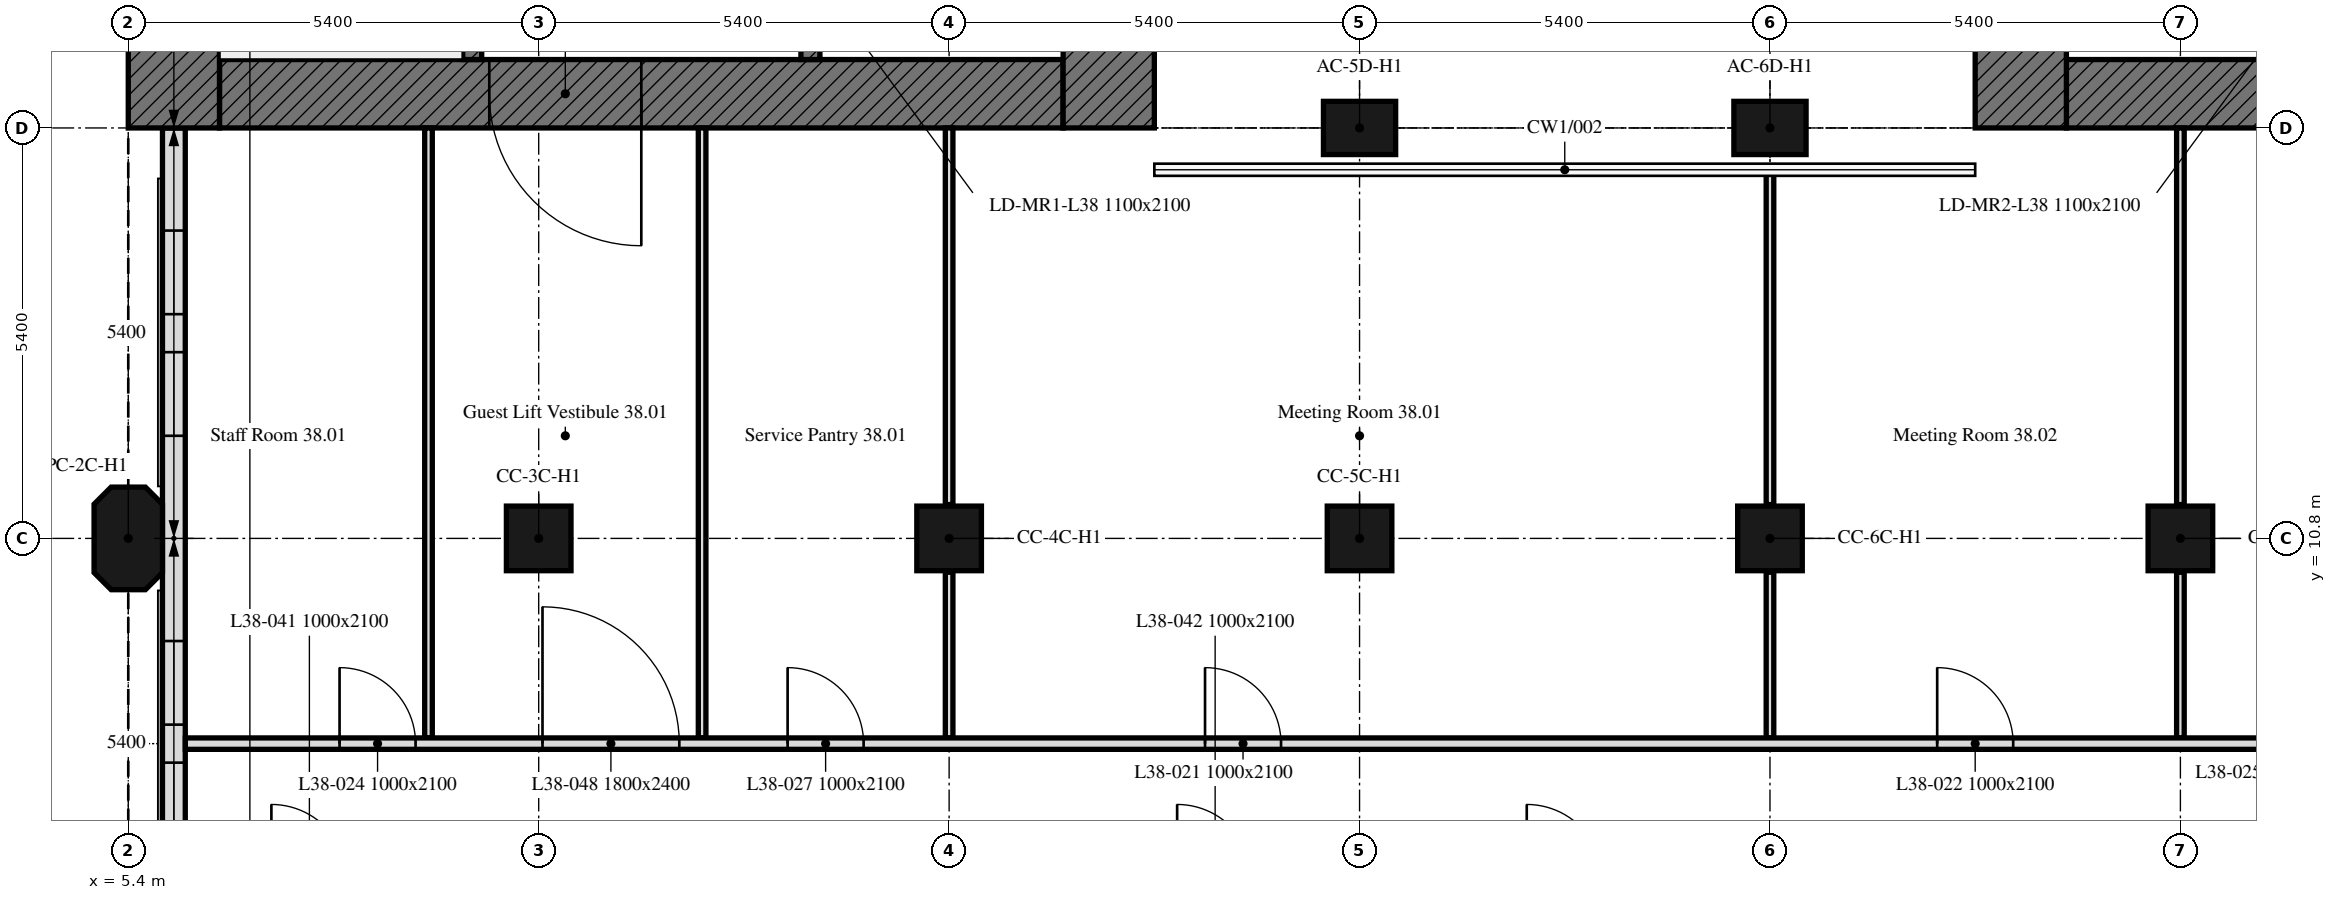
"""IFC4 building model, lengths in metres.
Left out: names, types, materials, properties, quantities, classifications, styles, units other than length and angle.
Written with IfcOpenShell. Run it as: python <this file> out.ifc"""

import sys

from ifc_helpers import new_model, si_unit, direction, frame, frame_2d, origin, origin_2d, place, context, subcontext, project, spatial, polyline, rectangle, outline, extrude, element, fill, save


model = new_model("IFC4")
c1 = context("Model", 3, precision=1e-05, world=origin(), true_north=direction((0.0, 1.0)))
c2 = subcontext(c1, "Body", "Model", "MODEL_VIEW")
j1 = project(units=[si_unit("LENGTHUNIT", "METRE"), si_unit("PLANEANGLEUNIT", "RADIAN")], contexts=[c1])
p1 = place(None, origin())
s1 = spatial("IfcSite", under=j1, at=p1, CompositionType="ELEMENT")
p2 = place(p1, origin())
s2 = spatial("IfcBuilding", under=s1, at=p2, CompositionType="ELEMENT")
p3 = place(p2, frame((0.0, 0.0, 162.7)))
s3 = spatial("IfcBuildingStorey", under=s2, at=p3, CompositionType="ELEMENT", Elevation=162.7)
p4 = place(p3, frame((5.4, 10.8, 0.0), z_axis=(0.0, 0.0, 1.0), x_axis=(0.0, 1.0, 0.0)))
e1 = element("IfcColumn", 1, at=p4, inside=s3, PredefinedType="COLUMN", context=c2, shape_type="SweptSolid", body=[
    extrude(outline(polyline([(-0.45, -0.45), (0.45, -0.45), (0.675, -0.225), (0.675, 0.225), (0.45, 0.45), (-0.45, 0.45), (-0.675, 0.225), (-0.675, -0.225), (-0.45, -0.45)])), origin(), (0.0, 0.0, 1.0), 3.0),
])
for number, where, z_axis, x_axis in (
    (2, (10.8, 10.8, 0.0), (0.0, 0.0, 1.0), (1.0, 0.0, 0.0)),
    (3, (16.2, 10.8, 0.0), (0.0, 0.0, 1.0), (1.0, 0.0, 0.0)),
    (4, (21.6, 10.8, 0.0), (0.0, 0.0, 1.0), (1.0, 0.0, 0.0)),
    (5, (27.0, 10.8, 0.0), (0.0, 0.0, 1.0), (1.0, 0.0, 0.0)),
    (6, (32.4, 10.8, 0.0), (0.0, 0.0, 1.0), (1.0, 0.0, 0.0)),
):
    element("IfcColumn", number, at=place(p3, frame(where, z_axis=z_axis, x_axis=x_axis)), inside=s3, PredefinedType="COLUMN", context=c2, shape_type="SweptSolid", body=[
        extrude(rectangle(XDim=0.85, YDim=0.85, at=origin_2d()), origin(), (0.0, 0.0, 1.0), 3.0),
    ])
for number, where, z_axis, x_axis in (
    (7, (21.6, 16.2, 0.0), (0.0, 0.0, 1.0), (1.0, 0.0, 0.0)),
    (8, (27.0, 16.2, 0.0), (0.0, 0.0, 1.0), (1.0, 0.0, 0.0)),
):
    element("IfcColumn", number, at=place(p3, frame(where, z_axis=z_axis, x_axis=x_axis)), inside=s3, PredefinedType="COLUMN", context=c2, shape_type="SweptSolid", body=[
        extrude(rectangle(XDim=0.95, YDim=0.7, at=origin_2d()), origin(), (0.0, 0.0, 1.0), 3.0),
    ])
p5 = place(p3, frame((6.0, 16.2, 0.0), z_axis=(0.0, 0.0, 1.0), x_axis=(0.0, -1.0, 0.0)))
e9 = element("IfcWall", 9, at=p5, inside=s3, PredefinedType="SOLIDWALL", context=c2, shape_type="SweptSolid", body=[
    extrude(rectangle(XDim=10.614, YDim=0.3, at=frame_2d((5.307, 0.0))), origin(), (0.0, 0.0, 1.0), 3.0),
])
p6 = place(p5, frame((1.35, 0.0, 0.9)))
e10 = element("IfcOpeningElement", 10, at=p6, cuts=e9, PredefinedType="OPENING", context=c2, shape_type="SweptSolid", body=[
    extrude(rectangle(XDim=1.1, YDim=1.7, at=frame_2d((0.55, 0.85))), frame((0.0, 0.16, 0.0), z_axis=(0.0, -1.0, 0.0), x_axis=(1.0, 0.0, 0.0)), (0.0, 0.0, 1.0), 0.32),
])
p7 = place(p5, frame((2.95, 0.0, 0.9)))
e11 = element("IfcOpeningElement", 11, at=p7, cuts=e9, PredefinedType="OPENING", context=c2, shape_type="SweptSolid", body=[
    extrude(rectangle(XDim=1.1, YDim=1.7, at=frame_2d((0.55, 0.85))), frame((0.0, 0.16, 0.0), z_axis=(0.0, -1.0, 0.0), x_axis=(1.0, 0.0, 0.0)), (0.0, 0.0, 1.0), 0.32),
])
p8 = place(p5, frame((6.75, 0.0, 0.9)))
e12 = element("IfcOpeningElement", 12, at=p8, cuts=e9, PredefinedType="OPENING", context=c2, shape_type="SweptSolid", body=[
    extrude(rectangle(XDim=1.1, YDim=1.7, at=frame_2d((0.55, 0.85))), frame((0.0, 0.16, 0.0), z_axis=(0.0, -1.0, 0.0), x_axis=(1.0, 0.0, 0.0)), (0.0, 0.0, 1.0), 0.32),
])
p9 = place(p5, frame((8.35, 0.0, 0.9)))
e13 = element("IfcOpeningElement", 13, at=p9, cuts=e9, PredefinedType="OPENING", context=c2, shape_type="SweptSolid", body=[
    extrude(rectangle(XDim=1.1, YDim=1.7, at=frame_2d((0.55, 0.85))), frame((0.0, 0.16, 0.0), z_axis=(0.0, -1.0, 0.0), x_axis=(1.0, 0.0, 0.0)), (0.0, 0.0, 1.0), 0.32),
])
p10 = place(p3, frame((17.7, 16.65, 0.0), z_axis=(0.0, 0.0, 1.0), x_axis=(-1.0, 0.0, 0.0)))
e14 = element("IfcWall", 14, at=p10, inside=s3, PredefinedType="SOLIDWALL", context=c2, shape_type="SweptSolid", body=[
    extrude(rectangle(XDim=11.1, YDim=0.9, at=frame_2d((5.55, 0.0))), origin(), (0.0, 0.0, 1.0), 3.0),
])
p11 = place(p10, frame((5.55, 0.0, 0.0)))
e15 = element("IfcOpeningElement", 15, at=p11, cuts=e14, PredefinedType="OPENING", context=c2, shape_type="SweptSolid", body=[
    extrude(rectangle(XDim=2.0, YDim=2.4, at=frame_2d((1.0, 1.2))), frame((0.0, 0.45, 0.0), z_axis=(0.0, -1.0, 0.0), x_axis=(1.0, 0.0, 0.0)), (0.0, 0.0, 1.0), 0.9),
])
for number, where, z_axis, x_axis in (
    (16, (6.0, 16.2, 0.0), (0.0, 0.0, 1.0), (0.0, 1.0, 0.0)),
    (17, (18.3, 32.4, 0.0), (0.0, 0.0, 1.0), (0.0, -1.0, 0.0)),
):
    element("IfcWall", number, at=place(p3, frame(where, z_axis=z_axis, x_axis=x_axis)), inside=s3, PredefinedType="SOLIDWALL", context=c2, shape_type="SweptSolid", body=[
        extrude(rectangle(XDim=16.2, YDim=1.2, at=frame_2d((8.1, 0.0))), origin(), (0.0, 0.0, 1.0), 3.0),
    ])
p12 = place(p3, frame((9.925, 17.1, 0.0), z_axis=(0.0, 0.0, 1.0), x_axis=(0.0, 1.0, 0.0)))
e18 = element("IfcWall", 18, at=p12, inside=s3, PredefinedType="SOLIDWALL", context=c2, shape_type="SweptSolid", body=[
    extrude(rectangle(XDim=14.4, YDim=0.25, at=frame_2d((7.2, 0.0))), origin(), (0.0, 0.0, 1.0), 3.0),
])
p13 = place(p12, frame((4.6, 0.0, 0.0)))
e19 = element("IfcOpeningElement", 19, at=p13, cuts=e18, PredefinedType="OPENING", context=c2, shape_type="SweptSolid", body=[
    extrude(rectangle(XDim=1.0, YDim=2.1, at=frame_2d((0.5, 1.05))), frame((0.0, 0.125, 0.0), z_axis=(0.0, -1.0, 0.0), x_axis=(1.0, 0.0, 0.0)), (0.0, 0.0, 1.0), 0.25),
])
p14 = place(p12, frame((7.062, 0.0, 0.0)))
e20 = element("IfcOpeningElement", 20, at=p14, cuts=e18, PredefinedType="OPENING", context=c2, shape_type="SweptSolid", body=[
    extrude(rectangle(XDim=1.2, YDim=2.1, at=frame_2d((0.6, 1.05))), frame((0.0, 0.125, 0.0), z_axis=(0.0, -1.0, 0.0), x_axis=(1.0, 0.0, 0.0)), (0.0, 0.0, 1.0), 0.25),
])
p15 = place(p12, frame((10.106, 0.0, 0.0)))
e21 = element("IfcOpeningElement", 21, at=p15, cuts=e18, PredefinedType="OPENING", context=c2, shape_type="SweptSolid", body=[
    extrude(rectangle(XDim=0.9, YDim=2.1, at=frame_2d((0.45, 1.05))), frame((0.0, 0.125, 0.0), z_axis=(0.0, -1.0, 0.0), x_axis=(1.0, 0.0, 0.0)), (0.0, 0.0, 1.0), 0.25),
])
p16 = place(p12, frame((12.048, 0.0, 0.0)))
e22 = element("IfcOpeningElement", 22, at=p16, cuts=e18, PredefinedType="OPENING", context=c2, shape_type="SweptSolid", body=[
    extrude(rectangle(XDim=0.9, YDim=2.1, at=frame_2d((0.45, 1.05))), frame((0.0, 0.125, 0.0), z_axis=(0.0, -1.0, 0.0), x_axis=(1.0, 0.0, 0.0)), (0.0, 0.0, 1.0), 0.25),
])
p17 = place(p12, frame((13.354, 0.0, 0.0)))
e23 = element("IfcOpeningElement", 23, at=p17, cuts=e18, PredefinedType="OPENING", context=c2, shape_type="SweptSolid", body=[
    extrude(rectangle(XDim=0.9, YDim=2.1, at=frame_2d((0.45, 1.05))), frame((0.0, 0.125, 0.0), z_axis=(0.0, -1.0, 0.0), x_axis=(1.0, 0.0, 0.0)), (0.0, 0.0, 1.0), 0.25),
])
p18 = place(p3, frame((14.375, 17.1, 0.0), z_axis=(0.0, 0.0, 1.0), x_axis=(0.0, 1.0, 0.0)))
e24 = element("IfcWall", 24, at=p18, inside=s3, PredefinedType="SOLIDWALL", context=c2, shape_type="SweptSolid", body=[
    extrude(rectangle(XDim=14.4, YDim=0.25, at=frame_2d((7.2, 0.0))), origin(), (0.0, 0.0, 1.0), 3.0),
])
p19 = place(p18, frame((13.15, 0.0, 0.0)))
e25 = element("IfcOpeningElement", 25, at=p19, cuts=e24, PredefinedType="OPENING", context=c2, shape_type="SweptSolid", body=[
    extrude(rectangle(XDim=1.0, YDim=2.1, at=frame_2d((0.5, 1.05))), frame((0.0, 0.125, 0.0), z_axis=(0.0, -1.0, 0.0), x_axis=(1.0, 0.0, 0.0)), (0.0, 0.0, 1.0), 0.25),
])
p20 = place(p18, frame((0.6, 0.0, 0.0)))
e26 = element("IfcOpeningElement", 26, at=p20, cuts=e24, PredefinedType="OPENING", context=c2, shape_type="SweptSolid", body=[
    extrude(rectangle(XDim=1.1, YDim=2.1, at=frame_2d((0.55, 1.05))), frame((0.0, 0.125, 0.0), z_axis=(0.0, -1.0, 0.0), x_axis=(1.0, 0.0, 0.0)), (0.0, 0.0, 1.0), 0.25),
])
p21 = place(p18, frame((3.25, 0.0, 0.0)))
e27 = element("IfcOpeningElement", 27, at=p21, cuts=e24, PredefinedType="OPENING", context=c2, shape_type="SweptSolid", body=[
    extrude(rectangle(XDim=0.9, YDim=2.1, at=frame_2d((0.45, 1.05))), frame((0.0, 0.125, 0.0), z_axis=(0.0, -1.0, 0.0), x_axis=(1.0, 0.0, 0.0)), (0.0, 0.0, 1.0), 0.25),
])
p22 = place(p3, frame((42.0, 16.65, 0.0), z_axis=(0.0, 0.0, 1.0), x_axis=(-1.0, 0.0, 0.0)))
e28 = element("IfcWall", 28, at=p22, inside=s3, PredefinedType="SOLIDWALL", context=c2, shape_type="SweptSolid", body=[
    extrude(rectangle(XDim=11.1, YDim=0.9, at=frame_2d((5.55, 0.0))), origin(), (0.0, 0.0, 1.0), 3.0),
])
p23 = place(p22, frame((3.55, 0.0, 0.0)))
e29 = element("IfcOpeningElement", 29, at=p23, cuts=e28, PredefinedType="OPENING", context=c2, shape_type="SweptSolid", body=[
    extrude(rectangle(XDim=2.0, YDim=2.4, at=frame_2d((1.0, 1.2))), frame((0.0, 0.45, 0.0), z_axis=(0.0, -1.0, 0.0), x_axis=(1.0, 0.0, 0.0)), (0.0, 0.0, 1.0), 0.9),
])
p24 = place(p3, frame((30.3, 16.2, 0.0), z_axis=(0.0, 0.0, 1.0), x_axis=(0.0, 1.0, 0.0)))
e30 = element("IfcWall", 30, at=p24, inside=s3, PredefinedType="SOLIDWALL", context=c2, shape_type="SweptSolid", body=[
    extrude(rectangle(XDim=16.2, YDim=1.2, at=frame_2d((8.1, 0.0))), origin(), (0.0, 0.0, 1.0), 3.0),
])
p25 = place(p3, frame((16.2, 16.2, 0.0), z_axis=(0.0, 0.0, 1.0), x_axis=(0.0, -1.0, 0.0)))
e31 = element("IfcWall", 31, at=p25, inside=s3, PredefinedType="PARTITIONING", context=c2, shape_type="SweptSolid", body=[
    extrude(rectangle(XDim=4.955, YDim=0.1, at=frame_2d((2.478, 0.0))), origin(), (0.0, 0.0, 1.0), 2.4),
])
for number, where, z_axis, x_axis in (
    (32, (16.2, 10.355, 0.0), (0.0, 0.0, 1.0), (0.0, -1.0, 0.0)),
    (33, (27.0, 8.175, 0.0), (0.0, 0.0, 1.0), (0.0, 1.0, 0.0)),
):
    element("IfcWall", number, at=place(p3, frame(where, z_axis=z_axis, x_axis=x_axis)), inside=s3, PredefinedType="PARTITIONING", context=c2, shape_type="SweptSolid", body=[
        extrude(rectangle(XDim=2.18, YDim=0.1, at=frame_2d((1.09, 0.0))), origin(), (0.0, 0.0, 1.0), 2.4),
    ])
p26 = place(p3, frame((27.0, 11.245, 0.0), z_axis=(0.0, 0.0, 1.0), x_axis=(0.0, 1.0, 0.0)))
e34 = element("IfcWall", 34, at=p26, inside=s3, PredefinedType="PARTITIONING", context=c2, shape_type="SweptSolid", body=[
    extrude(rectangle(XDim=4.46, YDim=0.1, at=frame_2d((2.23, 0.0))), origin(), (0.0, 0.0, 1.0), 2.4),
])
p27 = place(p3, frame((32.4, 8.175, 0.0), z_axis=(0.0, 0.0, 1.0), x_axis=(0.0, 1.0, 0.0)))
e35 = element("IfcWall", 35, at=p27, inside=s3, PredefinedType="PARTITIONING", context=c2, shape_type="SweptSolid", body=[
    extrude(rectangle(XDim=2.18, YDim=0.1, at=frame_2d((1.09, 0.0))), origin(), (0.0, 0.0, 1.0), 2.4),
])
p28 = place(p3, frame((32.4, 11.245, 0.0), z_axis=(0.0, 0.0, 1.0), x_axis=(0.0, 1.0, 0.0)))
e36 = element("IfcWall", 36, at=p28, inside=s3, PredefinedType="PARTITIONING", context=c2, shape_type="SweptSolid", body=[
    extrude(rectangle(XDim=4.955, YDim=0.1, at=frame_2d((2.478, 0.0))), origin(), (0.0, 0.0, 1.0), 2.4),
])
for number, where, z_axis, x_axis in (
    (37, (9.35, 16.2, 0.0), (0.0, 0.0, 1.0), (0.0, -1.0, 0.0)),
    (38, (12.95, 8.175, 0.0), (0.0, 0.0, 1.0), (0.0, 1.0, 0.0)),
):
    element("IfcWall", number, at=place(p3, frame(where, z_axis=z_axis, x_axis=x_axis)), inside=s3, PredefinedType="PARTITIONING", context=c2, shape_type="SweptSolid", body=[
        extrude(rectangle(XDim=8.025, YDim=0.1, at=frame_2d((4.012, 0.0))), origin(), (0.0, 0.0, 1.0), 3.0),
    ])
p29 = place(p3, frame((6.151, 8.1, 0.0), z_axis=(0.0, 0.0, 1.0), x_axis=(1.0, 0.0, 0.0)))
e39 = element("IfcWall", 39, at=p29, inside=s3, PredefinedType="PARTITIONING", context=c2, shape_type="SweptSolid", body=[
    extrude(rectangle(XDim=36.974, YDim=0.15, at=frame_2d((18.487, 0.0))), origin(), (0.0, 0.0, 1.0), 2.4),
])
p30 = place(p29, frame((13.416, 0.0, 0.0)))
e40 = element("IfcOpeningElement", 40, at=p30, cuts=e39, PredefinedType="OPENING", context=c2, shape_type="SweptSolid", body=[
    extrude(rectangle(XDim=1.0, YDim=2.1, at=frame_2d((0.5, 1.05))), frame((0.0, 0.075, 0.0), z_axis=(0.0, -1.0, 0.0), x_axis=(1.0, 0.0, 0.0)), (0.0, 0.0, 1.0), 0.15),
])
p31 = place(p29, frame((23.049, 0.0, 0.0)))
e41 = element("IfcOpeningElement", 41, at=p31, cuts=e39, PredefinedType="OPENING", context=c2, shape_type="SweptSolid", body=[
    extrude(rectangle(XDim=1.0, YDim=2.1, at=frame_2d((0.5, 1.05))), frame((0.0, 0.075, 0.0), z_axis=(0.0, -1.0, 0.0), x_axis=(1.0, 0.0, 0.0)), (0.0, 0.0, 1.0), 0.15),
])
p32 = place(p29, frame((2.029, 0.0, 0.0)))
e42 = element("IfcOpeningElement", 42, at=p32, cuts=e39, PredefinedType="OPENING", context=c2, shape_type="SweptSolid", body=[
    extrude(rectangle(XDim=1.0, YDim=2.1, at=frame_2d((0.5, 1.05))), frame((0.0, 0.075, 0.0), z_axis=(0.0, -1.0, 0.0), x_axis=(1.0, 0.0, 0.0)), (0.0, 0.0, 1.0), 0.15),
])
p33 = place(p29, frame((27.374, 0.0, 0.0)))
e43 = element("IfcOpeningElement", 43, at=p33, cuts=e39, PredefinedType="OPENING", context=c2, shape_type="SweptSolid", body=[
    extrude(rectangle(XDim=1.0, YDim=2.1, at=frame_2d((0.5, 1.05))), frame((0.0, 0.075, 0.0), z_axis=(0.0, -1.0, 0.0), x_axis=(1.0, 0.0, 0.0)), (0.0, 0.0, 1.0), 0.15),
])
p34 = place(p29, frame((7.924, 0.0, 0.0)))
e44 = element("IfcOpeningElement", 44, at=p34, cuts=e39, PredefinedType="OPENING", context=c2, shape_type="SweptSolid", body=[
    extrude(rectangle(XDim=1.0, YDim=2.1, at=frame_2d((0.5, 1.05))), frame((0.0, 0.075, 0.0), z_axis=(0.0, -1.0, 0.0), x_axis=(1.0, 0.0, 0.0)), (0.0, 0.0, 1.0), 0.15),
])
p35 = place(p29, frame((4.699, 0.0, 0.0)))
e45 = element("IfcOpeningElement", 45, at=p35, cuts=e39, PredefinedType="OPENING", context=c2, shape_type="SweptSolid", body=[
    extrude(rectangle(XDim=1.8, YDim=2.4, at=frame_2d((0.9, 1.2))), frame((0.0, 0.075, 0.0), z_axis=(0.0, -1.0, 0.0), x_axis=(1.0, 0.0, 0.0)), (0.0, 0.0, 1.0), 0.15),
])
p36 = place(p29, frame((30.199, 0.0, 0.0)))
e46 = element("IfcOpeningElement", 46, at=p36, cuts=e39, PredefinedType="OPENING", context=c2, shape_type="SweptSolid", body=[
    extrude(rectangle(XDim=1.0, YDim=2.1, at=frame_2d((0.5, 1.05))), frame((0.0, 0.075, 0.0), z_axis=(0.0, -1.0, 0.0), x_axis=(1.0, 0.0, 0.0)), (0.0, 0.0, 1.0), 0.15),
])
p37 = place(p6, origin())
e47 = element("IfcWindow", 47, at=p37, inside=s3, PartitioningType="SINGLE_PANEL", PredefinedType="WINDOW", context=c2, shape_type="SweptSolid", body=[
    extrude(rectangle(XDim=1.1, YDim=1.7, at=frame_2d((0.55, 0.85))), frame((0.0, 0.03, 0.0), z_axis=(0.0, -1.0, 0.0), x_axis=(1.0, 0.0, 0.0)), (0.0, 0.0, 1.0), 0.06),
])
fill(e10, e47)
p38 = place(p7, origin())
e48 = element("IfcWindow", 48, at=p38, inside=s3, PartitioningType="SINGLE_PANEL", PredefinedType="WINDOW", context=c2, shape_type="SweptSolid", body=[
    extrude(rectangle(XDim=1.1, YDim=1.7, at=frame_2d((0.55, 0.85))), frame((0.0, 0.03, 0.0), z_axis=(0.0, -1.0, 0.0), x_axis=(1.0, 0.0, 0.0)), (0.0, 0.0, 1.0), 0.06),
])
fill(e11, e48)
p39 = place(p8, origin())
e49 = element("IfcWindow", 49, at=p39, inside=s3, PartitioningType="SINGLE_PANEL", PredefinedType="WINDOW", context=c2, shape_type="SweptSolid", body=[
    extrude(rectangle(XDim=1.1, YDim=1.7, at=frame_2d((0.55, 0.85))), frame((0.0, 0.03, 0.0), z_axis=(0.0, -1.0, 0.0), x_axis=(1.0, 0.0, 0.0)), (0.0, 0.0, 1.0), 0.06),
])
fill(e12, e49)
p40 = place(p9, origin())
e50 = element("IfcWindow", 50, at=p40, inside=s3, PartitioningType="SINGLE_PANEL", PredefinedType="WINDOW", context=c2, shape_type="SweptSolid", body=[
    extrude(rectangle(XDim=1.1, YDim=1.7, at=frame_2d((0.55, 0.85))), frame((0.0, 0.03, 0.0), z_axis=(0.0, -1.0, 0.0), x_axis=(1.0, 0.0, 0.0)), (0.0, 0.0, 1.0), 0.06),
])
fill(e13, e50)
p41 = place(p11, origin())
e51 = element("IfcDoor", 51, at=p41, inside=s3, OperationType="DOUBLE_DOOR_SINGLE_SWING", PredefinedType="DOOR", context=c2, shape_type="SweptSolid", body=[
    extrude(rectangle(XDim=2.0, YDim=2.4, at=frame_2d((1.0, 1.2))), frame((0.0, 0.025, 0.0), z_axis=(0.0, -1.0, 0.0), x_axis=(1.0, 0.0, 0.0)), (0.0, 0.0, 1.0), 0.05),
])
fill(e15, e51)
p42 = place(p30, origin())
e52 = element("IfcDoor", 52, at=p42, inside=s3, OperationType="SINGLE_SWING_RIGHT", PredefinedType="DOOR", context=c2, shape_type="SweptSolid", body=[
    extrude(rectangle(XDim=1.0, YDim=2.1, at=frame_2d((0.5, 1.05))), frame((0.0, 0.025, 0.0), z_axis=(0.0, -1.0, 0.0), x_axis=(1.0, 0.0, 0.0)), (0.0, 0.0, 1.0), 0.05),
])
fill(e40, e52)
p43 = place(p31, origin())
e53 = element("IfcDoor", 53, at=p43, inside=s3, OperationType="SINGLE_SWING_LEFT", PredefinedType="DOOR", context=c2, shape_type="SweptSolid", body=[
    extrude(rectangle(XDim=1.0, YDim=2.1, at=frame_2d((0.5, 1.05))), frame((0.0, 0.025, 0.0), z_axis=(0.0, -1.0, 0.0), x_axis=(1.0, 0.0, 0.0)), (0.0, 0.0, 1.0), 0.05),
])
fill(e41, e53)
p44 = place(p32, origin())
e54 = element("IfcDoor", 54, at=p44, inside=s3, OperationType="SINGLE_SWING_LEFT", PredefinedType="DOOR", context=c2, shape_type="SweptSolid", body=[
    extrude(rectangle(XDim=1.0, YDim=2.1, at=frame_2d((0.5, 1.05))), frame((0.0, 0.025, 0.0), z_axis=(0.0, -1.0, 0.0), x_axis=(1.0, 0.0, 0.0)), (0.0, 0.0, 1.0), 0.05),
])
fill(e42, e54)
p45 = place(p34, origin())
e55 = element("IfcDoor", 55, at=p45, inside=s3, OperationType="SINGLE_SWING_RIGHT", PredefinedType="DOOR", context=c2, shape_type="SweptSolid", body=[
    extrude(rectangle(XDim=1.0, YDim=2.1, at=frame_2d((0.5, 1.05))), frame((0.0, 0.025, 0.0), z_axis=(0.0, -1.0, 0.0), x_axis=(1.0, 0.0, 0.0)), (0.0, 0.0, 1.0), 0.05),
])
fill(e44, e55)
p46 = place(p35, origin())
e56 = element("IfcDoor", 56, at=p46, inside=s3, OperationType="DOUBLE_DOOR_SINGLE_SWING", PredefinedType="DOOR", context=c2, shape_type="SweptSolid", body=[
    extrude(rectangle(XDim=1.8, YDim=2.4, at=frame_2d((0.9, 1.2))), frame((0.0, 0.025, 0.0), z_axis=(0.0, -1.0, 0.0), x_axis=(1.0, 0.0, 0.0)), (0.0, 0.0, 1.0), 0.05),
])
fill(e45, e56)
save(model, sys.argv[1])
